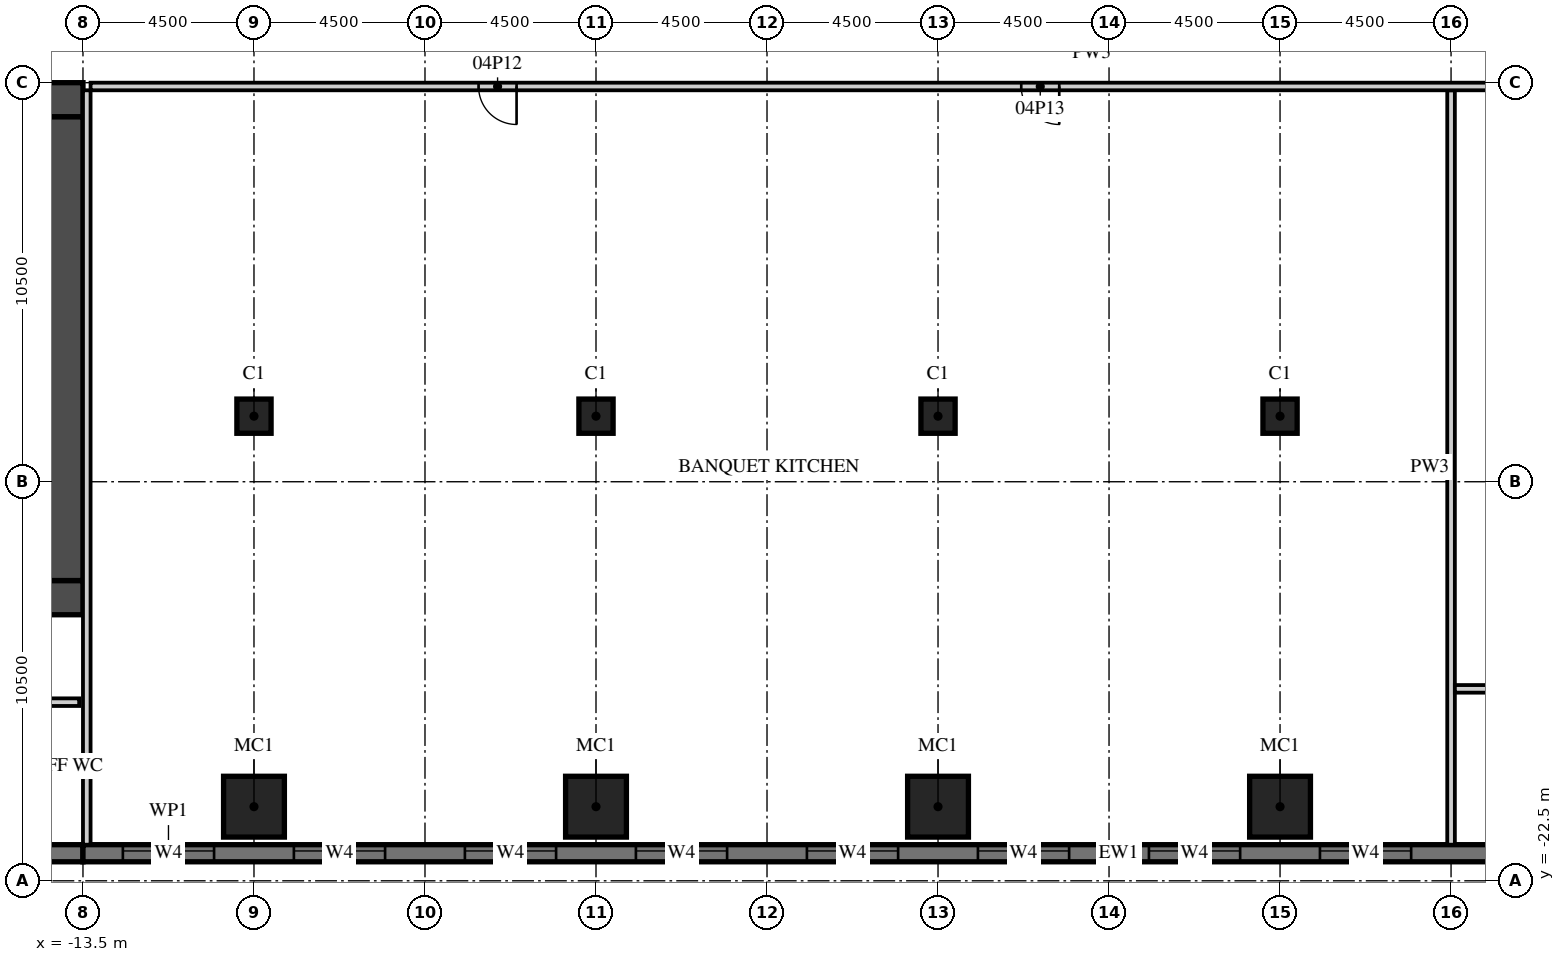
"""IFC4 building model, lengths in metres.
Left out: names, types, materials, properties, quantities, classifications, styles, units other than length and angle.
Written with IfcOpenShell. Run it as: python <this file> out.ifc"""

import sys

from ifc_helpers import new_model, si_unit, direction, frame, frame_2d, origin, origin_2d, place, context, subcontext, project, spatial, rectangle, extrude, element, fill, save


model = new_model("IFC4")
c1 = context("Model", 3, precision=1e-05, world=origin(), true_north=direction((0.0, 1.0)))
c2 = subcontext(c1, "Body", "Model", "MODEL_VIEW")
j1 = project(units=[si_unit("LENGTHUNIT", "METRE"), si_unit("PLANEANGLEUNIT", "RADIAN")], contexts=[c1])
p1 = place(None, origin())
s1 = spatial("IfcSite", under=j1, at=p1, CompositionType="ELEMENT")
p2 = place(p1, origin())
s2 = spatial("IfcBuilding", under=s1, at=p2, CompositionType="ELEMENT")
p3 = place(p2, frame((0.0, 0.0, 29.0)))
s3 = spatial("IfcBuildingStorey", under=s2, at=p3, CompositionType="ELEMENT", Elevation=29.0)
for number, where, z_axis, x_axis in (
    (1, (-9.0, -20.55, 0.0), (0.0, 0.0, 1.0), (1.0, 0.0, 0.0)),
    (2, (0.0, -20.55, 0.0), (0.0, 0.0, 1.0), (1.0, 0.0, 0.0)),
    (3, (9.0, -20.55, 0.0), (0.0, 0.0, 1.0), (1.0, 0.0, 0.0)),
    (4, (18.0, -20.55, 0.0), (0.0, 0.0, 1.0), (1.0, 0.0, 0.0)),
):
    element("IfcColumn", number, at=place(p3, frame(where, z_axis=z_axis, x_axis=x_axis)), inside=s3, PredefinedType="COLUMN", context=c2, shape_type="SweptSolid", body=[
        extrude(rectangle(XDim=1.6, YDim=1.6, at=origin_2d()), origin(), (0.0, 0.0, 1.0), 4.5),
    ])
for number, where, z_axis, x_axis in (
    (5, (-9.0, -10.275, 0.0), (0.0, 0.0, 1.0), (1.0, 0.0, 0.0)),
    (6, (0.0, -10.275, 0.0), (0.0, 0.0, 1.0), (1.0, 0.0, 0.0)),
    (7, (9.0, -10.275, 0.0), (0.0, 0.0, 1.0), (1.0, 0.0, 0.0)),
    (8, (18.0, -10.275, 0.0), (0.0, 0.0, 1.0), (1.0, 0.0, 0.0)),
):
    element("IfcColumn", number, at=place(p3, frame(where, z_axis=z_axis, x_axis=x_axis)), inside=s3, PredefinedType="COLUMN", context=c2, shape_type="SweptSolid", body=[
        extrude(rectangle(XDim=0.9, YDim=0.9, at=origin_2d()), origin(), (0.0, 0.0, 1.0), 4.5),
    ])
p4 = place(p3, frame((-31.5, -21.775, 0.0), z_axis=(0.0, 0.0, 1.0), x_axis=(1.0, 0.0, 0.0)))
e9 = element("IfcWall", 9, at=p4, inside=s3, PredefinedType="SOLIDWALL", context=c2, shape_type="SweptSolid", body=[
    extrude(rectangle(XDim=18.0, YDim=0.45, at=frame_2d((9.0, 0.0))), origin(), (0.0, 0.0, 1.0), 4.05),
])
p5 = place(p3, frame((-13.5, -21.775, 0.0), z_axis=(0.0, 0.0, 1.0), x_axis=(1.0, 0.0, 0.0)))
e10 = element("IfcWall", 10, at=p5, inside=s3, PredefinedType="SOLIDWALL", context=c2, shape_type="SweptSolid", body=[
    extrude(rectangle(XDim=54.5, YDim=0.45, at=frame_2d((27.25, 0.0))), origin(), (0.0, 0.0, 1.0), 4.05),
])
p6 = place(p5, frame((1.05, 0.0, 0.9)))
e11 = element("IfcOpeningElement", 11, at=p6, cuts=e10, PredefinedType="OPENING", context=c2, shape_type="SweptSolid", body=[
    extrude(rectangle(XDim=2.4, YDim=1.8, at=frame_2d((1.2, 0.9))), frame((0.0, 0.235, 0.0), z_axis=(0.0, -1.0, 0.0), x_axis=(1.0, 0.0, 0.0)), (0.0, 0.0, 1.0), 0.47),
])
p7 = place(p5, frame((5.55, 0.0, 0.9)))
e12 = element("IfcOpeningElement", 12, at=p7, cuts=e10, PredefinedType="OPENING", context=c2, shape_type="SweptSolid", body=[
    extrude(rectangle(XDim=2.4, YDim=1.8, at=frame_2d((1.2, 0.9))), frame((0.0, 0.235, 0.0), z_axis=(0.0, -1.0, 0.0), x_axis=(1.0, 0.0, 0.0)), (0.0, 0.0, 1.0), 0.47),
])
p8 = place(p5, frame((10.05, 0.0, 0.9)))
e13 = element("IfcOpeningElement", 13, at=p8, cuts=e10, PredefinedType="OPENING", context=c2, shape_type="SweptSolid", body=[
    extrude(rectangle(XDim=2.4, YDim=1.8, at=frame_2d((1.2, 0.9))), frame((0.0, 0.235, 0.0), z_axis=(0.0, -1.0, 0.0), x_axis=(1.0, 0.0, 0.0)), (0.0, 0.0, 1.0), 0.47),
])
p9 = place(p5, frame((14.55, 0.0, 0.9)))
e14 = element("IfcOpeningElement", 14, at=p9, cuts=e10, PredefinedType="OPENING", context=c2, shape_type="SweptSolid", body=[
    extrude(rectangle(XDim=2.4, YDim=1.8, at=frame_2d((1.2, 0.9))), frame((0.0, 0.235, 0.0), z_axis=(0.0, -1.0, 0.0), x_axis=(1.0, 0.0, 0.0)), (0.0, 0.0, 1.0), 0.47),
])
p10 = place(p5, frame((19.05, 0.0, 0.9)))
e15 = element("IfcOpeningElement", 15, at=p10, cuts=e10, PredefinedType="OPENING", context=c2, shape_type="SweptSolid", body=[
    extrude(rectangle(XDim=2.4, YDim=1.8, at=frame_2d((1.2, 0.9))), frame((0.0, 0.235, 0.0), z_axis=(0.0, -1.0, 0.0), x_axis=(1.0, 0.0, 0.0)), (0.0, 0.0, 1.0), 0.47),
])
p11 = place(p5, frame((23.55, 0.0, 0.9)))
e16 = element("IfcOpeningElement", 16, at=p11, cuts=e10, PredefinedType="OPENING", context=c2, shape_type="SweptSolid", body=[
    extrude(rectangle(XDim=2.4, YDim=1.8, at=frame_2d((1.2, 0.9))), frame((0.0, 0.235, 0.0), z_axis=(0.0, -1.0, 0.0), x_axis=(1.0, 0.0, 0.0)), (0.0, 0.0, 1.0), 0.47),
])
p12 = place(p5, frame((28.05, 0.0, 0.9)))
e17 = element("IfcOpeningElement", 17, at=p12, cuts=e10, PredefinedType="OPENING", context=c2, shape_type="SweptSolid", body=[
    extrude(rectangle(XDim=2.4, YDim=1.8, at=frame_2d((1.2, 0.9))), frame((0.0, 0.235, 0.0), z_axis=(0.0, -1.0, 0.0), x_axis=(1.0, 0.0, 0.0)), (0.0, 0.0, 1.0), 0.47),
])
p13 = place(p5, frame((32.55, 0.0, 0.9)))
e18 = element("IfcOpeningElement", 18, at=p13, cuts=e10, PredefinedType="OPENING", context=c2, shape_type="SweptSolid", body=[
    extrude(rectangle(XDim=2.4, YDim=1.8, at=frame_2d((1.2, 0.9))), frame((0.0, 0.235, 0.0), z_axis=(0.0, -1.0, 0.0), x_axis=(1.0, 0.0, 0.0)), (0.0, 0.0, 1.0), 0.47),
])
p14 = place(p5, frame((37.05, 0.0, 0.9)))
e19 = element("IfcOpeningElement", 19, at=p14, cuts=e10, PredefinedType="OPENING", context=c2, shape_type="SweptSolid", body=[
    extrude(rectangle(XDim=2.4, YDim=1.8, at=frame_2d((1.2, 0.9))), frame((0.0, 0.235, 0.0), z_axis=(0.0, -1.0, 0.0), x_axis=(1.0, 0.0, 0.0)), (0.0, 0.0, 1.0), 0.47),
])
p15 = place(p5, frame((41.55, 0.0, 0.9)))
e20 = element("IfcOpeningElement", 20, at=p15, cuts=e10, PredefinedType="OPENING", context=c2, shape_type="SweptSolid", body=[
    extrude(rectangle(XDim=2.4, YDim=1.8, at=frame_2d((1.2, 0.9))), frame((0.0, 0.235, 0.0), z_axis=(0.0, -1.0, 0.0), x_axis=(1.0, 0.0, 0.0)), (0.0, 0.0, 1.0), 0.47),
])
p16 = place(p5, frame((46.05, 0.0, 0.9)))
e21 = element("IfcOpeningElement", 21, at=p16, cuts=e10, PredefinedType="OPENING", context=c2, shape_type="SweptSolid", body=[
    extrude(rectangle(XDim=2.4, YDim=1.8, at=frame_2d((1.2, 0.9))), frame((0.0, 0.235, 0.0), z_axis=(0.0, -1.0, 0.0), x_axis=(1.0, 0.0, 0.0)), (0.0, 0.0, 1.0), 0.47),
])
p17 = place(p3, frame((-31.5, -1.95, 0.0), z_axis=(0.0, 0.0, 1.0), x_axis=(1.0, 0.0, 0.0)))
e22 = element("IfcWall", 22, at=p17, inside=s3, PredefinedType="SHEAR", context=c2, shape_type="SweptSolid", body=[
    extrude(rectangle(XDim=18.0, YDim=0.9, at=frame_2d((9.0, 0.0))), origin(), (0.0, 0.0, 1.0), 4.05),
])
p18 = place(p17, frame((14.725, 0.0, 0.0)))
e23 = element("IfcOpeningElement", 23, at=p18, cuts=e22, PredefinedType="OPENING", context=c2, shape_type="SweptSolid", body=[
    extrude(rectangle(XDim=1.8, YDim=2.1, at=frame_2d((0.9, 1.05))), frame((0.0, 0.46, 0.0), z_axis=(0.0, -1.0, 0.0), x_axis=(1.0, 0.0, 0.0)), (0.0, 0.0, 1.0), 0.92),
])
p19 = place(p3, frame((-20.3, -15.05, 0.0), z_axis=(0.0, 0.0, 1.0), x_axis=(1.0, 0.0, 0.0)))
e24 = element("IfcWall", 24, at=p19, inside=s3, PredefinedType="SHEAR", context=c2, shape_type="SweptSolid", body=[
    extrude(rectangle(XDim=6.8, YDim=0.9, at=frame_2d((3.4, 0.0))), origin(), (0.0, 0.0, 1.0), 4.05),
])
p20 = place(p19, frame((0.875, 0.0, 0.0)))
e25 = element("IfcOpeningElement", 25, at=p20, cuts=e24, PredefinedType="OPENING", context=c2, shape_type="SweptSolid", body=[
    extrude(rectangle(XDim=1.2, YDim=2.1, at=frame_2d((0.6, 1.05))), frame((0.0, 0.46, 0.0), z_axis=(0.0, -1.0, 0.0), x_axis=(1.0, 0.0, 0.0)), (0.0, 0.0, 1.0), 0.92),
])
p21 = place(p3, frame((-13.95, -14.6, 0.0), z_axis=(0.0, 0.0, 1.0), x_axis=(0.0, 1.0, 0.0)))
e26 = element("IfcWall", 26, at=p21, inside=s3, PredefinedType="SHEAR", context=c2, shape_type="SweptSolid", body=[
    extrude(rectangle(XDim=12.2, YDim=0.9, at=frame_2d((6.1, 0.0))), origin(), (0.0, 0.0, 1.0), 4.05),
])
p22 = place(p3, frame((-44.55, -17.8, 0.0), z_axis=(0.0, 0.0, 1.0), x_axis=(1.0, 0.0, 0.0)))
e27 = element("IfcWall", 27, at=p22, inside=s3, PredefinedType="PARTITIONING", context=c2, shape_type="SweptSolid", body=[
    extrude(rectangle(XDim=30.95, YDim=0.2, at=frame_2d((15.475, 0.0))), origin(), (0.0, 0.0, 1.0), 4.05),
])
p23 = place(p22, frame((15.038, 0.0, 0.0)))
e28 = element("IfcOpeningElement", 28, at=p23, cuts=e27, PredefinedType="OPENING", context=c2, shape_type="SweptSolid", body=[
    extrude(rectangle(XDim=0.9, YDim=2.1, at=frame_2d((0.45, 1.05))), frame((0.0, 0.11, 0.0), z_axis=(0.0, -1.0, 0.0), x_axis=(1.0, 0.0, 0.0)), (0.0, 0.0, 1.0), 0.22),
])
p24 = place(p22, frame((23.337, 0.0, 0.0)))
e29 = element("IfcOpeningElement", 29, at=p24, cuts=e27, PredefinedType="OPENING", context=c2, shape_type="SweptSolid", body=[
    extrude(rectangle(XDim=0.9, YDim=2.1, at=frame_2d((0.45, 1.05))), frame((0.0, 0.11, 0.0), z_axis=(0.0, -1.0, 0.0), x_axis=(1.0, 0.0, 0.0)), (0.0, 0.0, 1.0), 0.22),
])
p25 = place(p3, frame((22.5, -21.55, 0.0), z_axis=(0.0, 0.0, 1.0), x_axis=(0.0, 1.0, 0.0)))
e30 = element("IfcWall", 30, at=p25, inside=s3, PredefinedType="PARTITIONING", context=c2, shape_type="SweptSolid", body=[
    extrude(rectangle(XDim=19.85, YDim=0.2, at=frame_2d((9.925, 0.0))), origin(), (0.0, 0.0, 1.0), 4.05),
])
p26 = place(p3, frame((22.6, -17.45, 0.0), z_axis=(0.0, 0.0, 1.0), x_axis=(1.0, 0.0, 0.0)))
e31 = element("IfcWall", 31, at=p26, inside=s3, PredefinedType="PARTITIONING", context=c2, shape_type="SweptSolid", body=[
    extrude(rectangle(XDim=8.8, YDim=0.2, at=frame_2d((4.4, 0.0))), origin(), (0.0, 0.0, 1.0), 4.05),
])
p27 = place(p26, frame((2.4, 0.0, 0.0)))
e32 = element("IfcOpeningElement", 32, at=p27, cuts=e31, PredefinedType="OPENING", context=c2, shape_type="SweptSolid", body=[
    extrude(rectangle(XDim=0.9, YDim=2.1, at=frame_2d((0.45, 1.05))), frame((0.0, 0.11, 0.0), z_axis=(0.0, -1.0, 0.0), x_axis=(1.0, 0.0, 0.0)), (0.0, 0.0, 1.0), 0.22),
])
p28 = place(p3, frame((-13.3, -1.6, 0.0), z_axis=(0.0, 0.0, 1.0), x_axis=(1.0, 0.0, 0.0)))
e33 = element("IfcWall", 33, at=p28, inside=s3, PredefinedType="PARTITIONING", context=c2, shape_type="SweptSolid", body=[
    extrude(rectangle(XDim=52.7, YDim=0.2, at=frame_2d((26.35, 0.0))), origin(), (0.0, 0.0, 1.0), 4.05),
])
p29 = place(p28, frame((10.21, 0.0, 0.0)))
e34 = element("IfcOpeningElement", 34, at=p29, cuts=e33, PredefinedType="OPENING", context=c2, shape_type="SweptSolid", body=[
    extrude(rectangle(XDim=1.0, YDim=2.1, at=frame_2d((0.5, 1.05))), frame((0.0, 0.11, 0.0), z_axis=(0.0, -1.0, 0.0), x_axis=(1.0, 0.0, 0.0)), (0.0, 0.0, 1.0), 0.22),
])
p30 = place(p28, frame((24.49, 0.0, 0.0)))
e35 = element("IfcOpeningElement", 35, at=p30, cuts=e33, PredefinedType="OPENING", context=c2, shape_type="SweptSolid", body=[
    extrude(rectangle(XDim=1.0, YDim=2.1, at=frame_2d((0.5, 1.05))), frame((0.0, 0.11, 0.0), z_axis=(0.0, -1.0, 0.0), x_axis=(1.0, 0.0, 0.0)), (0.0, 0.0, 1.0), 0.22),
])
p31 = place(p28, frame((37.125, 0.0, 0.0)))
e36 = element("IfcOpeningElement", 36, at=p31, cuts=e33, PredefinedType="OPENING", context=c2, shape_type="SweptSolid", body=[
    extrude(rectangle(XDim=1.2, YDim=2.1, at=frame_2d((0.6, 1.05))), frame((0.0, 0.11, 0.0), z_axis=(0.0, -1.0, 0.0), x_axis=(1.0, 0.0, 0.0)), (0.0, 0.0, 1.0), 0.22),
])
p32 = place(p28, frame((48.2, 0.0, 0.0)))
e37 = element("IfcOpeningElement", 37, at=p32, cuts=e33, PredefinedType="OPENING", context=c2, shape_type="SweptSolid", body=[
    extrude(rectangle(XDim=1.0, YDim=2.1, at=frame_2d((0.5, 1.05))), frame((0.0, 0.11, 0.0), z_axis=(0.0, -1.0, 0.0), x_axis=(1.0, 0.0, 0.0)), (0.0, 0.0, 1.0), 0.22),
])
p33 = place(p3, frame((-13.4, -21.55, 0.0), z_axis=(0.0, 0.0, 1.0), x_axis=(0.0, 1.0, 0.0)))
e38 = element("IfcWall", 38, at=p33, inside=s3, PredefinedType="PARTITIONING", context=c2, shape_type="SweptSolid", body=[
    extrude(rectangle(XDim=19.85, YDim=0.2, at=frame_2d((9.925, 0.0))), origin(), (0.0, 0.0, 1.0), 4.05),
])
p34 = place(p6, origin())
e39 = element("IfcWindow", 39, at=p34, inside=s3, PartitioningType="SINGLE_PANEL", PredefinedType="WINDOW", context=c2, shape_type="SweptSolid", body=[
    extrude(rectangle(XDim=2.4, YDim=1.8, at=frame_2d((1.2, 0.9))), frame((0.0, 0.09, 0.0), z_axis=(0.0, -1.0, 0.0), x_axis=(1.0, 0.0, 0.0)), (0.0, 0.0, 1.0), 0.06),
])
fill(e11, e39)
p35 = place(p7, origin())
e40 = element("IfcWindow", 40, at=p35, inside=s3, PartitioningType="SINGLE_PANEL", PredefinedType="WINDOW", context=c2, shape_type="SweptSolid", body=[
    extrude(rectangle(XDim=2.4, YDim=1.8, at=frame_2d((1.2, 0.9))), frame((0.0, 0.09, 0.0), z_axis=(0.0, -1.0, 0.0), x_axis=(1.0, 0.0, 0.0)), (0.0, 0.0, 1.0), 0.06),
])
fill(e12, e40)
p36 = place(p8, origin())
e41 = element("IfcWindow", 41, at=p36, inside=s3, PartitioningType="SINGLE_PANEL", PredefinedType="WINDOW", context=c2, shape_type="SweptSolid", body=[
    extrude(rectangle(XDim=2.4, YDim=1.8, at=frame_2d((1.2, 0.9))), frame((0.0, 0.09, 0.0), z_axis=(0.0, -1.0, 0.0), x_axis=(1.0, 0.0, 0.0)), (0.0, 0.0, 1.0), 0.06),
])
fill(e13, e41)
p37 = place(p9, origin())
e42 = element("IfcWindow", 42, at=p37, inside=s3, PartitioningType="SINGLE_PANEL", PredefinedType="WINDOW", context=c2, shape_type="SweptSolid", body=[
    extrude(rectangle(XDim=2.4, YDim=1.8, at=frame_2d((1.2, 0.9))), frame((0.0, 0.09, 0.0), z_axis=(0.0, -1.0, 0.0), x_axis=(1.0, 0.0, 0.0)), (0.0, 0.0, 1.0), 0.06),
])
fill(e14, e42)
p38 = place(p10, origin())
e43 = element("IfcWindow", 43, at=p38, inside=s3, PartitioningType="SINGLE_PANEL", PredefinedType="WINDOW", context=c2, shape_type="SweptSolid", body=[
    extrude(rectangle(XDim=2.4, YDim=1.8, at=frame_2d((1.2, 0.9))), frame((0.0, 0.09, 0.0), z_axis=(0.0, -1.0, 0.0), x_axis=(1.0, 0.0, 0.0)), (0.0, 0.0, 1.0), 0.06),
])
fill(e15, e43)
p39 = place(p11, origin())
e44 = element("IfcWindow", 44, at=p39, inside=s3, PartitioningType="SINGLE_PANEL", PredefinedType="WINDOW", context=c2, shape_type="SweptSolid", body=[
    extrude(rectangle(XDim=2.4, YDim=1.8, at=frame_2d((1.2, 0.9))), frame((0.0, 0.09, 0.0), z_axis=(0.0, -1.0, 0.0), x_axis=(1.0, 0.0, 0.0)), (0.0, 0.0, 1.0), 0.06),
])
fill(e16, e44)
p40 = place(p12, origin())
e45 = element("IfcWindow", 45, at=p40, inside=s3, PartitioningType="SINGLE_PANEL", PredefinedType="WINDOW", context=c2, shape_type="SweptSolid", body=[
    extrude(rectangle(XDim=2.4, YDim=1.8, at=frame_2d((1.2, 0.9))), frame((0.0, 0.09, 0.0), z_axis=(0.0, -1.0, 0.0), x_axis=(1.0, 0.0, 0.0)), (0.0, 0.0, 1.0), 0.06),
])
fill(e17, e45)
p41 = place(p13, origin())
e46 = element("IfcWindow", 46, at=p41, inside=s3, PartitioningType="SINGLE_PANEL", PredefinedType="WINDOW", context=c2, shape_type="SweptSolid", body=[
    extrude(rectangle(XDim=2.4, YDim=1.8, at=frame_2d((1.2, 0.9))), frame((0.0, 0.09, 0.0), z_axis=(0.0, -1.0, 0.0), x_axis=(1.0, 0.0, 0.0)), (0.0, 0.0, 1.0), 0.06),
])
fill(e18, e46)
p42 = place(p29, origin())
e47 = element("IfcDoor", 47, at=p42, inside=s3, OperationType="SINGLE_SWING_RIGHT", PredefinedType="DOOR", context=c2, shape_type="SweptSolid", body=[
    extrude(rectangle(XDim=1.0, YDim=2.1, at=frame_2d((0.5, 1.05))), frame((0.0, 0.025, 0.0), z_axis=(0.0, -1.0, 0.0), x_axis=(1.0, 0.0, 0.0)), (0.0, 0.0, 1.0), 0.05),
])
fill(e34, e47)
p43 = place(p30, origin())
e48 = element("IfcDoor", 48, at=p43, inside=s3, OperationType="SINGLE_SWING_RIGHT", PredefinedType="DOOR", context=c2, shape_type="SweptSolid", body=[
    extrude(rectangle(XDim=1.0, YDim=2.1, at=frame_2d((0.5, 1.05))), frame((0.0, 0.025, 0.0), z_axis=(0.0, -1.0, 0.0), x_axis=(1.0, 0.0, 0.0)), (0.0, 0.0, 1.0), 0.05),
])
fill(e35, e48)
save(model, sys.argv[1])
